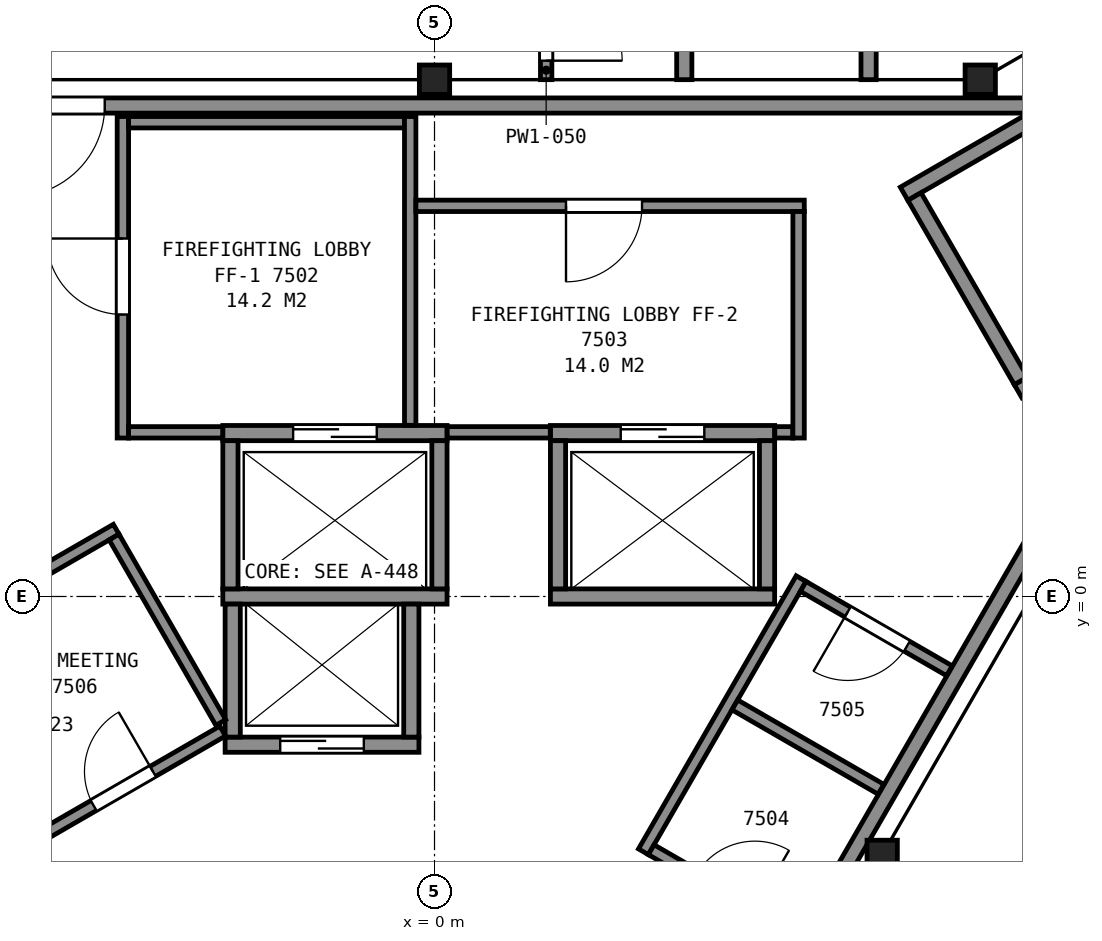
"""IFC4 building model, lengths in metres.
Left out: names, types, materials, properties, quantities, classifications, styles, units other than length and angle.
Written with IfcOpenShell. Run it as: python <this file> out.ifc"""

import sys

from ifc_helpers import new_model, si_unit, direction, frame, frame_2d, origin, origin_2d, place, context, subcontext, project, spatial, rectangle, i_section, extrude, element, fill, save


model = new_model("IFC4")
c1 = context("Model", 3, precision=1e-05, world=origin(), true_north=direction((0.0, 1.0)))
c2 = subcontext(c1, "Body", "Model", "MODEL_VIEW")
j1 = project(units=[si_unit("LENGTHUNIT", "METRE"), si_unit("PLANEANGLEUNIT", "RADIAN")], contexts=[c1])
p1 = place(None, origin())
s1 = spatial("IfcSite", under=j1, at=p1, CompositionType="ELEMENT")
p2 = place(p1, origin())
s2 = spatial("IfcBuilding", under=s1, at=p2, CompositionType="ELEMENT")
p3 = place(p2, frame((0.0, 0.0, 297.3)))
s3 = spatial("IfcBuildingStorey", under=s2, at=p3, CompositionType="ELEMENT", Elevation=297.3)
for number, where, z_axis, x_axis in (
    (1, (7.18, 6.8, 0.0), (0.0, 0.0, 1.0), (1.0, 0.0, 0.0)),
    (2, (0.0, 6.8, 0.0), (0.0, 0.0, 1.0), (1.0, 0.0, 0.0)),
    (3, (5.89, -3.4, 0.0), (0.0, 0.0, 1.0), (1.0, 0.0, 0.0)),
):
    element("IfcColumn", number, at=place(p3, frame(where, z_axis=z_axis, x_axis=x_axis)), inside=s3, PredefinedType="COLUMN", context=c2, shape_type="SweptSolid", body=[
        extrude(i_section(OverallWidth=0.399, OverallDepth=0.386, WebThickness=0.021, FlangeThickness=0.033, FilletRadius=0.015, at=origin_2d()), origin(), (0.0, 0.0, 1.0), 3.7),
    ])
for number, where, z_axis, x_axis in (
    (4, (6.178, 5.299, 0.0), (0.0, 0.0, 1.0), (0.866, 0.5, 0.0)),
    (5, (7.678, 2.701, 0.0), (0.0, 0.0, 1.0), (0.866, 0.5, 0.0)),
):
    element("IfcWall", number, at=place(p3, frame(where, z_axis=z_axis, x_axis=x_axis)), inside=s3, PredefinedType="PARTITIONING", context=c2, shape_type="SweptSolid", body=[
        extrude(rectangle(XDim=7.2, YDim=0.2, at=frame_2d((3.6, 0.0))), origin(), (0.0, 0.0, 1.0), 3.45),
    ])
p4 = place(p3, frame((7.715, 2.838, 0.0), z_axis=(0.0, 0.0, 1.0), x_axis=(-0.500049511043, 0.865996816683, 0.0)))
e6 = element("IfcWall", 6, at=p4, inside=s3, PredefinedType="PARTITIONING", context=c2, shape_type="SweptSolid", body=[
    extrude(rectangle(XDim=2.8, YDim=0.2, at=frame_2d((1.4, 0.0))), origin(), (0.0, 0.0, 1.0), 3.45),
])
p5 = place(p3, frame((-2.755, -1.95, 0.0), z_axis=(0.0, 0.0, 1.0), x_axis=(1.0, 0.0, 0.0)))
e7 = element("IfcWall", 7, at=p5, inside=s3, PredefinedType="PARTITIONING", context=c2, shape_type="SweptSolid", body=[
    extrude(rectangle(XDim=2.55, YDim=0.2, at=frame_2d((1.275, 0.0))), origin(), (0.0, 0.0, 1.0), 3.7),
])
p6 = place(p5, frame((0.725, 0.0, 0.0)))
e8 = element("IfcOpeningElement", 8, at=p6, cuts=e7, PredefinedType="OPENING", context=c2, shape_type="SweptSolid", body=[
    extrude(rectangle(XDim=1.1, YDim=2.1, at=frame_2d((0.55, 1.05))), frame((0.0, 0.11, 0.0), z_axis=(0.0, -1.0, 0.0), x_axis=(1.0, 0.0, 0.0)), (0.0, 0.0, 1.0), 0.22),
])
p7 = place(p3, frame((-2.785, 0.0, 0.0), z_axis=(0.0, 0.0, 1.0), x_axis=(1.0, 0.0, 0.0)))
e9 = element("IfcWall", 9, at=p7, inside=s3, PredefinedType="PARTITIONING", context=c2, shape_type="SweptSolid", body=[
    extrude(rectangle(XDim=2.95, YDim=0.2, at=frame_2d((1.475, 0.0))), origin(), (0.0, 0.0, 1.0), 3.7),
])
p8 = place(p3, frame((1.525, 0.0, 0.0), z_axis=(0.0, 0.0, 1.0), x_axis=(1.0, 0.0, 0.0)))
e10 = element("IfcWall", 10, at=p8, inside=s3, PredefinedType="PARTITIONING", context=c2, shape_type="SweptSolid", body=[
    extrude(rectangle(XDim=2.95, YDim=0.2, at=frame_2d((1.475, 0.0))), origin(), (0.0, 0.0, 1.0), 3.7),
])
p9 = place(p3, frame((-2.785, 2.15, 0.0), z_axis=(0.0, 0.0, 1.0), x_axis=(1.0, 0.0, 0.0)))
e11 = element("IfcWall", 11, at=p9, inside=s3, PredefinedType="PARTITIONING", context=c2, shape_type="SweptSolid", body=[
    extrude(rectangle(XDim=2.95, YDim=0.2, at=frame_2d((1.475, 0.0))), origin(), (0.0, 0.0, 1.0), 3.7),
])
p10 = place(p9, frame((0.925, 0.0, 0.0)))
e12 = element("IfcOpeningElement", 12, at=p10, cuts=e11, PredefinedType="OPENING", context=c2, shape_type="SweptSolid", body=[
    extrude(rectangle(XDim=1.1, YDim=2.1, at=frame_2d((0.55, 1.05))), frame((0.0, 0.11, 0.0), z_axis=(0.0, -1.0, 0.0), x_axis=(1.0, 0.0, 0.0)), (0.0, 0.0, 1.0), 0.22),
])
p11 = place(p3, frame((1.525, 2.15, 0.0), z_axis=(0.0, 0.0, 1.0), x_axis=(1.0, 0.0, 0.0)))
e13 = element("IfcWall", 13, at=p11, inside=s3, PredefinedType="PARTITIONING", context=c2, shape_type="SweptSolid", body=[
    extrude(rectangle(XDim=2.95, YDim=0.2, at=frame_2d((1.475, 0.0))), origin(), (0.0, 0.0, 1.0), 3.7),
])
p12 = place(p11, frame((0.925, 0.0, 0.0)))
e14 = element("IfcOpeningElement", 14, at=p12, cuts=e13, PredefinedType="OPENING", context=c2, shape_type="SweptSolid", body=[
    extrude(rectangle(XDim=1.1, YDim=2.1, at=frame_2d((0.55, 1.05))), frame((0.0, 0.11, 0.0), z_axis=(0.0, -1.0, 0.0), x_axis=(1.0, 0.0, 0.0)), (0.0, 0.0, 1.0), 0.22),
])
for number, where, z_axis, x_axis in (
    (15, (4.375, 0.1, 0.0), (0.0, 0.0, 1.0), (0.0, 1.0, 0.0)),
    (16, (1.625, 0.1, 0.0), (0.0, 0.0, 1.0), (0.0, 1.0, 0.0)),
    (17, (0.065, 0.1, 0.0), (0.0, 0.0, 1.0), (0.0, 1.0, 0.0)),
):
    element("IfcWall", number, at=place(p3, frame(where, z_axis=z_axis, x_axis=x_axis)), inside=s3, PredefinedType="PARTITIONING", context=c2, shape_type="SweptSolid", body=[
        extrude(rectangle(XDim=1.95, YDim=0.2, at=frame_2d((0.975, 0.0))), origin(), (0.0, 0.0, 1.0), 3.7),
    ])
for number, where, z_axis, x_axis in (
    (18, (-0.305, -1.85, 0.0), (0.0, 0.0, 1.0), (0.0, 1.0, 0.0)),
    (19, (-2.655, -1.85, 0.0), (0.0, 0.0, 1.0), (0.0, 1.0, 0.0)),
):
    element("IfcWall", number, at=place(p3, frame(where, z_axis=z_axis, x_axis=x_axis)), inside=s3, PredefinedType="PARTITIONING", context=c2, shape_type="SweptSolid", body=[
        extrude(rectangle(XDim=1.75, YDim=0.2, at=frame_2d((0.875, 0.0))), origin(), (0.0, 0.0, 1.0), 3.7),
    ])
p13 = place(p3, frame((-2.685, 0.1, 0.0), z_axis=(0.0, 0.0, 1.0), x_axis=(0.0, 1.0, 0.0)))
e20 = element("IfcWall", 20, at=p13, inside=s3, PredefinedType="PARTITIONING", context=c2, shape_type="SweptSolid", body=[
    extrude(rectangle(XDim=1.95, YDim=0.2, at=frame_2d((0.975, 0.0))), origin(), (0.0, 0.0, 1.0), 3.7),
])
p14 = place(p3, frame((7.829, 6.46, 0.0), z_axis=(0.0, 0.0, 1.0), x_axis=(-1.0, 0.0, 0.0)))
e21 = element("IfcWall", 21, at=p14, inside=s3, PredefinedType="PARTITIONING", context=c2, shape_type="SweptSolid", body=[
    extrude(rectangle(XDim=15.658, YDim=0.2, at=frame_2d((7.829, 0.0))), origin(), (0.0, 0.0, 1.0), 3.45),
])
p15 = place(p14, frame((12.168, 0.0, 0.0)))
e22 = element("IfcOpeningElement", 22, at=p15, cuts=e21, PredefinedType="OPENING", context=c2, shape_type="SweptSolid", body=[
    extrude(rectangle(XDim=1.2, YDim=2.1, at=frame_2d((0.6, 1.05))), frame((0.0, 0.11, 0.0), z_axis=(0.0, -1.0, 0.0), x_axis=(1.0, 0.0, 0.0)), (0.0, 0.0, 1.0), 0.22),
])
p16 = place(p3, frame((-7.141, -0.551, 0.0), z_axis=(0.0, 0.0, 1.0), x_axis=(0.500001302854, -0.86602465158, 0.0)))
e23 = element("IfcWall", 23, at=p16, inside=s3, PredefinedType="PARTITIONING", context=c2, shape_type="SweptSolid", body=[
    extrude(rectangle(XDim=6.846, YDim=0.2, at=frame_2d((3.423, 0.0))), origin(), (0.0, 0.0, 1.0), 3.45),
])
p17 = place(p16, frame((4.983, 0.0, 0.0)))
e24 = element("IfcOpeningElement", 24, at=p17, cuts=e23, PredefinedType="OPENING", context=c2, shape_type="SweptSolid", body=[
    extrude(rectangle(XDim=1.2, YDim=2.1, at=frame_2d((0.6, 1.05))), frame((0.0, 0.11, 0.0), z_axis=(0.0, -1.0, 0.0), x_axis=(1.0, 0.0, 0.0)), (0.0, 0.0, 1.0), 0.22),
])
p18 = place(p3, frame((-6.938, -0.703, 0.0), z_axis=(0.0, 0.0, 1.0), x_axis=(0.866029357279, 0.499993152284, 0.0)))
e25 = element("IfcWall", 25, at=p18, inside=s3, PredefinedType="PARTITIONING", context=c2, shape_type="SweptSolid", body=[
    extrude(rectangle(XDim=3.175, YDim=0.15, at=frame_2d((1.587, 0.0))), origin(), (0.0, 0.0, 1.0), 3.45),
])
p19 = place(p3, frame((-5.438, -3.301, 0.0), z_axis=(0.0, 0.0, 1.0), x_axis=(0.865961047596, 0.500111451624, 0.0)))
e26 = element("IfcWall", 26, at=p19, inside=s3, PredefinedType="PARTITIONING", context=c2, shape_type="SweptSolid", body=[
    extrude(rectangle(XDim=3.06, YDim=0.15, at=frame_2d((1.53, 0.0))), origin(), (0.0, 0.0, 1.0), 3.45),
])
p20 = place(p19, frame((1.1, 0.0, 0.0)))
e27 = element("IfcOpeningElement", 27, at=p20, cuts=e26, PredefinedType="OPENING", context=c2, shape_type="SweptSolid", body=[
    extrude(rectangle(XDim=0.9, YDim=2.1, at=frame_2d((0.45, 1.05))), frame((0.0, 0.085, 0.0), z_axis=(0.0, -1.0, 0.0), x_axis=(1.0, 0.0, 0.0)), (0.0, 0.0, 1.0), 0.17),
])
p21 = place(p3, frame((-4.216, 0.782, 0.0), z_axis=(0.0, 0.0, 1.0), x_axis=(0.498733469436, -0.866755401751, 0.0)))
e28 = element("IfcWall", 28, at=p21, inside=s3, PredefinedType="PARTITIONING", context=c2, shape_type="SweptSolid", body=[
    extrude(rectangle(XDim=2.815, YDim=0.15, at=frame_2d((1.407, 0.0))), origin(), (0.0, 0.0, 1.0), 3.45),
])
p22 = place(p3, frame((-4.1, 2.085, 0.0), z_axis=(0.0, 0.0, 1.0), x_axis=(0.0, 1.0, 0.0)))
e29 = element("IfcWall", 29, at=p22, inside=s3, PredefinedType="PARTITIONING", context=c2, shape_type="SweptSolid", body=[
    extrude(rectangle(XDim=4.23, YDim=0.15, at=frame_2d((2.115, 0.0))), origin(), (0.0, 0.0, 1.0), 3.45),
])
p23 = place(p22, frame((1.625, 0.0, 0.0)))
e30 = element("IfcOpeningElement", 30, at=p23, cuts=e29, PredefinedType="OPENING", context=c2, shape_type="SweptSolid", body=[
    extrude(rectangle(XDim=1.0, YDim=2.1, at=frame_2d((0.5, 1.05))), frame((0.0, 0.085, 0.0), z_axis=(0.0, -1.0, 0.0), x_axis=(1.0, 0.0, 0.0)), (0.0, 0.0, 1.0), 0.17),
])
p24 = place(p3, frame((-4.025, 2.16, 0.0), z_axis=(0.0, 0.0, 1.0), x_axis=(1.0, 0.0, 0.0)))
e31 = element("IfcWall", 31, at=p24, inside=s3, PredefinedType="PARTITIONING", context=c2, shape_type="SweptSolid", body=[
    extrude(rectangle(XDim=1.238, YDim=0.15, at=frame_2d((0.619, 0.0))), origin(), (0.0, 0.0, 1.0), 3.45),
])
p25 = place(p3, frame((-4.025, 6.24, 0.0), z_axis=(0.0, 0.0, 1.0), x_axis=(1.0, 0.0, 0.0)))
e32 = element("IfcWall", 32, at=p25, inside=s3, PredefinedType="PARTITIONING", context=c2, shape_type="SweptSolid", body=[
    extrude(rectangle(XDim=3.63, YDim=0.15, at=frame_2d((1.815, 0.0))), origin(), (0.0, 0.0, 1.0), 3.45),
])
p26 = place(p3, frame((-0.32, 2.252, 0.0), z_axis=(0.0, 0.0, 1.0), x_axis=(0.0, 1.0, 0.0)))
e33 = element("IfcWall", 33, at=p26, inside=s3, PredefinedType="PARTITIONING", context=c2, shape_type="SweptSolid", body=[
    extrude(rectangle(XDim=4.063, YDim=0.15, at=frame_2d((2.031, 0.0))), origin(), (0.0, 0.0, 1.0), 3.45),
])
p27 = place(p3, frame((-0.245, 5.14, 0.0), z_axis=(0.0, 0.0, 1.0), x_axis=(1.0, 0.0, 0.0)))
e34 = element("IfcWall", 34, at=p27, inside=s3, PredefinedType="PARTITIONING", context=c2, shape_type="SweptSolid", body=[
    extrude(rectangle(XDim=5.11, YDim=0.15, at=frame_2d((2.555, 0.0))), origin(), (0.0, 0.0, 1.0), 3.45),
])
p28 = place(p27, frame((1.975, 0.0, 0.0)))
e35 = element("IfcOpeningElement", 35, at=p28, cuts=e34, PredefinedType="OPENING", context=c2, shape_type="SweptSolid", body=[
    extrude(rectangle(XDim=1.0, YDim=2.1, at=frame_2d((0.5, 1.05))), frame((0.0, 0.085, 0.0), z_axis=(0.0, -1.0, 0.0), x_axis=(1.0, 0.0, 0.0)), (0.0, 0.0, 1.0), 0.17),
])
p29 = place(p3, frame((0.167, 2.16, 0.0), z_axis=(0.0, 0.0, 1.0), x_axis=(1.0, 0.0, 0.0)))
e36 = element("IfcWall", 36, at=p29, inside=s3, PredefinedType="PARTITIONING", context=c2, shape_type="SweptSolid", body=[
    extrude(rectangle(XDim=1.356, YDim=0.15, at=frame_2d((0.678, 0.0))), origin(), (0.0, 0.0, 1.0), 3.45),
])
p30 = place(p3, frame((2.749, -3.359, 0.0), z_axis=(0.0, 0.0, 1.0), x_axis=(0.500017827812, 0.866015110648, 0.0)))
e37 = element("IfcWall", 37, at=p30, inside=s3, PredefinedType="PARTITIONING", context=c2, shape_type="SweptSolid", body=[
    extrude(rectangle(XDim=4.15, YDim=0.15, at=frame_2d((2.075, 0.0))), origin(), (0.0, 0.0, 1.0), 3.45),
])
p31 = place(p3, frame((2.851, -3.332, 0.0), z_axis=(0.0, 0.0, 1.0), x_axis=(0.866110524189, -0.499852538144, 0.0)))
e38 = element("IfcWall", 38, at=p31, inside=s3, PredefinedType="PARTITIONING", context=c2, shape_type="SweptSolid", body=[
    extrude(rectangle(XDim=2.22, YDim=0.15, at=frame_2d((1.11, 0.0))), origin(), (0.0, 0.0, 1.0), 3.45),
])
p32 = place(p31, frame((0.675, 0.0, 0.0)))
e39 = element("IfcOpeningElement", 39, at=p32, cuts=e38, PredefinedType="OPENING", context=c2, shape_type="SweptSolid", body=[
    extrude(rectangle(XDim=0.9, YDim=2.1, at=frame_2d((0.45, 1.05))), frame((0.0, 0.085, 0.0), z_axis=(0.0, -1.0, 0.0), x_axis=(1.0, 0.0, 0.0)), (0.0, 0.0, 1.0), 0.17),
])
p33 = place(p3, frame((3.828, -6.29, 0.0), z_axis=(0.0, 0.0, 1.0), x_axis=(0.499979739078, 0.866037101117, 0.0)))
e40 = element("IfcWall", 40, at=p33, inside=s3, PredefinedType="PARTITIONING", context=c2, shape_type="SweptSolid", body=[
    extrude(rectangle(XDim=11.363, YDim=0.2, at=frame_2d((5.681, 0.0))), origin(), (0.0, 0.0, 1.0), 3.45),
])
p34 = place(p33, frame((0.55, 0.0, 0.0)))
e41 = element("IfcOpeningElement", 41, at=p34, cuts=e40, PredefinedType="OPENING", context=c2, shape_type="SweptSolid", body=[
    extrude(rectangle(XDim=1.2, YDim=2.1, at=frame_2d((0.6, 1.05))), frame((0.0, 0.11, 0.0), z_axis=(0.0, -1.0, 0.0), x_axis=(1.0, 0.0, 0.0)), (0.0, 0.0, 1.0), 0.22),
])
p35 = place(p3, frame((3.951, -1.427, 0.0), z_axis=(0.0, 0.0, 1.0), x_axis=(0.866062920605, -0.499935013329, 0.0)))
e42 = element("IfcWall", 42, at=p35, inside=s3, PredefinedType="PARTITIONING", context=c2, shape_type="SweptSolid", body=[
    extrude(rectangle(XDim=2.22, YDim=0.15, at=frame_2d((1.11, 0.0))), origin(), (0.0, 0.0, 1.0), 3.45),
])
p36 = place(p3, frame((4.477, 2.16, 0.0), z_axis=(0.0, 0.0, 1.0), x_axis=(1.0, 0.0, 0.0)))
e43 = element("IfcWall", 43, at=p36, inside=s3, PredefinedType="PARTITIONING", context=c2, shape_type="SweptSolid", body=[
    extrude(rectangle(XDim=0.238, YDim=0.15, at=frame_2d((0.119, 0.0))), origin(), (0.0, 0.0, 1.0), 3.45),
])
p37 = place(p3, frame((6.774, -0.978, 0.0), z_axis=(0.0, 0.0, 1.0), x_axis=(-0.866062920605, 0.499935013329, 0.0)))
e44 = element("IfcWall", 44, at=p37, inside=s3, PredefinedType="PARTITIONING", context=c2, shape_type="SweptSolid", body=[
    extrude(rectangle(XDim=2.22, YDim=0.15, at=frame_2d((1.11, 0.0))), origin(), (0.0, 0.0, 1.0), 3.45),
])
p38 = place(p37, frame((0.646, 0.0, 0.0)))
e45 = element("IfcOpeningElement", 45, at=p38, cuts=e44, PredefinedType="OPENING", context=c2, shape_type="SweptSolid", body=[
    extrude(rectangle(XDim=0.9, YDim=2.1, at=frame_2d((0.45, 1.05))), frame((0.0, 0.085, 0.0), z_axis=(0.0, -1.0, 0.0), x_axis=(1.0, 0.0, 0.0)), (0.0, 0.0, 1.0), 0.17),
])
p39 = place(p3, frame((4.79, 2.085, 0.0), z_axis=(0.0, 0.0, 1.0), x_axis=(0.0, 1.0, 0.0)))
e46 = element("IfcWall", 46, at=p39, inside=s3, PredefinedType="PARTITIONING", context=c2, shape_type="SweptSolid", body=[
    extrude(rectangle(XDim=2.98, YDim=0.15, at=frame_2d((1.49, 0.0))), origin(), (0.0, 0.0, 1.0), 3.45),
])
p40 = place(p3, frame((1.469, 8.269, 0.0), z_axis=(0.0, 0.0, 1.0), x_axis=(0.0, -1.0, 0.0)))
e47 = element("IfcWall", 47, at=p40, inside=s3, PredefinedType="PARTITIONING", context=c2, shape_type="SweptSolid", body=[
    extrude(rectangle(XDim=1.469, YDim=0.15, at=frame_2d((0.734, 0.0))), origin(), (0.0, 0.0, 1.0), 2.723),
])
p41 = place(p40, frame((0.219, 0.0, 0.0)))
e48 = element("IfcOpeningElement", 48, at=p41, cuts=e47, PredefinedType="OPENING", context=c2, shape_type="SweptSolid", body=[
    extrude(rectangle(XDim=1.0, YDim=2.1, at=frame_2d((0.5, 1.05))), frame((0.0, 0.085, 0.0), z_axis=(0.0, -1.0, 0.0), x_axis=(1.0, 0.0, 0.0)), (0.0, 0.0, 1.0), 0.17),
])
p42 = place(p3, frame((3.286, 6.8, 0.0), z_axis=(0.0, 0.0, 1.0), x_axis=(0.0, 1.0, 0.0)))
e49 = element("IfcWall", 49, at=p42, inside=s3, PredefinedType="PARTITIONING", context=c2, shape_type="SweptSolid", body=[
    extrude(rectangle(XDim=2.765, YDim=0.2, at=frame_2d((1.382, 0.0))), origin(), (0.0, 0.0, 1.0), 2.723),
])
p43 = place(p3, frame((5.711, 6.8, 0.0), z_axis=(0.0, 0.0, 1.0), x_axis=(0.0, 1.0, 0.0)))
e50 = element("IfcWall", 50, at=p43, inside=s3, PredefinedType="PARTITIONING", context=c2, shape_type="SweptSolid", body=[
    extrude(rectangle(XDim=1.569, YDim=0.2, at=frame_2d((0.784, 0.0))), origin(), (0.0, 0.0, 1.0), 2.723),
])
p44 = place(p6, origin())
e51 = element("IfcDoor", 51, at=p44, inside=s3, OperationType="SLIDING_TO_RIGHT", PredefinedType="DOOR", context=c2, shape_type="SweptSolid", body=[
    extrude(rectangle(XDim=1.1, YDim=2.1, at=frame_2d((0.55, 1.05))), frame((0.0, 0.025, 0.0), z_axis=(0.0, -1.0, 0.0), x_axis=(1.0, 0.0, 0.0)), (0.0, 0.0, 1.0), 0.05),
])
fill(e8, e51)
p45 = place(p10, origin())
e52 = element("IfcDoor", 52, at=p45, inside=s3, OperationType="SLIDING_TO_LEFT", PredefinedType="DOOR", context=c2, shape_type="SweptSolid", body=[
    extrude(rectangle(XDim=1.1, YDim=2.1, at=frame_2d((0.55, 1.05))), frame((0.0, 0.025, 0.0), z_axis=(0.0, -1.0, 0.0), x_axis=(1.0, 0.0, 0.0)), (0.0, 0.0, 1.0), 0.05),
])
fill(e12, e52)
p46 = place(p12, origin())
e53 = element("IfcDoor", 53, at=p46, inside=s3, OperationType="SLIDING_TO_RIGHT", PredefinedType="DOOR", context=c2, shape_type="SweptSolid", body=[
    extrude(rectangle(XDim=1.1, YDim=2.1, at=frame_2d((0.55, 1.05))), frame((0.0, 0.025, 0.0), z_axis=(0.0, -1.0, 0.0), x_axis=(1.0, 0.0, 0.0)), (0.0, 0.0, 1.0), 0.05),
])
fill(e14, e53)
p47 = place(p15, origin())
e54 = element("IfcDoor", 54, at=p47, inside=s3, OperationType="SINGLE_SWING_RIGHT", PredefinedType="DOOR", context=c2, shape_type="SweptSolid", body=[
    extrude(rectangle(XDim=1.2, YDim=2.1, at=frame_2d((0.6, 1.05))), frame((0.0, 0.025, 0.0), z_axis=(0.0, -1.0, 0.0), x_axis=(1.0, 0.0, 0.0)), (0.0, 0.0, 1.0), 0.05),
])
fill(e22, e54)
p48 = place(p20, origin())
e55 = element("IfcDoor", 55, at=p48, inside=s3, OperationType="SINGLE_SWING_RIGHT", PredefinedType="DOOR", context=c2, shape_type="SweptSolid", body=[
    extrude(rectangle(XDim=0.9, YDim=2.1, at=frame_2d((0.45, 1.05))), frame((0.0, 0.025, 0.0), z_axis=(0.0, -1.0, 0.0), x_axis=(1.0, 0.0, 0.0)), (0.0, 0.0, 1.0), 0.05),
])
fill(e27, e55)
p49 = place(p23, origin())
e56 = element("IfcDoor", 56, at=p49, inside=s3, OperationType="SINGLE_SWING_RIGHT", PredefinedType="DOOR", context=c2, shape_type="SweptSolid", body=[
    extrude(rectangle(XDim=1.0, YDim=2.1, at=frame_2d((0.5, 1.05))), frame((0.0, 0.025, 0.0), z_axis=(0.0, -1.0, 0.0), x_axis=(1.0, 0.0, 0.0)), (0.0, 0.0, 1.0), 0.05),
])
fill(e30, e56)
p50 = place(p28, origin())
e57 = element("IfcDoor", 57, at=p50, inside=s3, OperationType="SINGLE_SWING_LEFT", PredefinedType="DOOR", context=c2, shape_type="SweptSolid", body=[
    extrude(rectangle(XDim=1.0, YDim=2.1, at=frame_2d((0.5, 1.05))), frame((0.0, 0.025, 0.0), z_axis=(0.0, -1.0, 0.0), x_axis=(1.0, 0.0, 0.0)), (0.0, 0.0, 1.0), 0.05),
])
fill(e35, e57)
p51 = place(p38, origin())
e58 = element("IfcDoor", 58, at=p51, inside=s3, OperationType="SINGLE_SWING_RIGHT", PredefinedType="DOOR", context=c2, shape_type="SweptSolid", body=[
    extrude(rectangle(XDim=0.9, YDim=2.1, at=frame_2d((0.45, 1.05))), frame((0.0, 0.025, 0.0), z_axis=(0.0, -1.0, 0.0), x_axis=(1.0, 0.0, 0.0)), (0.0, 0.0, 1.0), 0.05),
])
fill(e45, e58)
p52 = place(p41, origin())
e59 = element("IfcDoor", 59, at=p52, inside=s3, OperationType="SINGLE_SWING_RIGHT", PredefinedType="DOOR", context=c2, shape_type="SweptSolid", body=[
    extrude(rectangle(XDim=1.0, YDim=2.1, at=frame_2d((0.5, 1.05))), frame((0.0, 0.025, 0.0), z_axis=(0.0, -1.0, 0.0), x_axis=(1.0, 0.0, 0.0)), (0.0, 0.0, 1.0), 0.05),
])
fill(e48, e59)
save(model, sys.argv[1])
